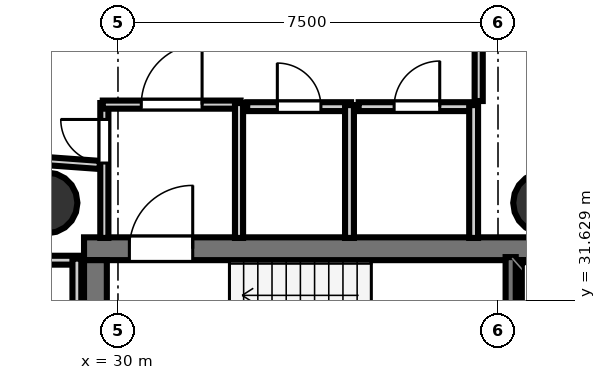
"""IFC4 building model, lengths in metres.
Left out: names, types, materials, properties, quantities, classifications, styles, units other than length and angle.
Written with IfcOpenShell. Run it as: python <this file> out.ifc"""

import sys

from ifc_helpers import new_model, si_unit, direction, frame, frame_2d, origin, origin_2d, place, context, subcontext, project, spatial, rectangle, hollow_circle, extrude, element, fill, save


model = new_model("IFC4")
c1 = context("Model", 3, precision=1e-05, world=origin(), true_north=direction((0.0, 1.0)))
c2 = subcontext(c1, "Body", "Model", "MODEL_VIEW")
j1 = project(units=[si_unit("LENGTHUNIT", "METRE"), si_unit("PLANEANGLEUNIT", "RADIAN")], contexts=[c1])
p1 = place(None, origin())
s1 = spatial("IfcSite", under=j1, at=p1, CompositionType="ELEMENT")
p2 = place(p1, origin())
s2 = spatial("IfcBuilding", under=s1, at=p2, CompositionType="ELEMENT")
p3 = place(p2, frame((0.0, 0.0, 189.2)))
s3 = spatial("IfcBuildingStorey", under=s2, at=p3, CompositionType="ELEMENT", Elevation=189.2)
p4 = place(p3, frame((29.33, 32.645, 0.0), z_axis=(0.0, 0.0, 1.0), x_axis=(1.0, 0.0, 0.0)))
e1 = element("IfcWall", 1, at=p4, inside=s3, PredefinedType="SHEAR", context=c2, shape_type="SweptSolid", body=[
    extrude(rectangle(XDim=10.52, YDim=0.45, at=frame_2d((5.26, 0.0))), origin(), (0.0, 0.0, 1.0), 3.52),
])
p5 = place(p4, frame((0.895, 0.0, 0.0)))
e2 = element("IfcOpeningElement", 2, at=p5, cuts=e1, PredefinedType="OPENING", context=c2, shape_type="SweptSolid", body=[
    extrude(rectangle(XDim=1.25, YDim=2.15, at=frame_2d((0.625, 1.075))), frame((0.0, 0.235, 0.0), z_axis=(0.0, -1.0, 0.0), x_axis=(1.0, 0.0, 0.0)), (0.0, 0.0, 1.0), 0.47),
])
for number, where, z_axis, x_axis in (
    (3, (29.555, 24.98, 0.0), (0.0, 0.0, 1.0), (0.0, 1.0, 0.0)),
    (4, (38.18, 24.98, 0.0), (0.0, 0.0, 1.0), (0.0, 1.0, 0.0)),
):
    element("IfcWall", number, at=place(p3, frame(where, z_axis=z_axis, x_axis=x_axis)), inside=s3, PredefinedType="SHEAR", context=c2, shape_type="SweptSolid", body=[
        extrude(rectangle(XDim=7.44, YDim=0.45, at=frame_2d((3.72, 0.0))), origin(), (0.0, 0.0, 1.0), 3.52),
    ])
for number, where, z_axis, x_axis in (
    (5, (28.6, 33.55, 0.0), (0.0, 0.0, 1.0), (1.0, 0.0, 0.0)),
    (6, (38.4, 33.55, 0.0), (0.0, 0.0, 1.0), (1.0, 0.0, 0.0)),
):
    element("IfcColumn", number, at=place(p3, frame(where, z_axis=z_axis, x_axis=x_axis)), inside=s3, PredefinedType="COLUMN", context=c2, shape_type="SweptSolid", body=[
        extrude(hollow_circle(Radius=0.6, WallThickness=0.03, at=origin_2d()), origin(), (0.0, 0.0, 1.0), 3.7),
    ])
p6 = place(p3, frame((37.75, 30.12, 0.0), z_axis=(0.0, 0.0, 1.0), x_axis=(0.0, 1.0, 0.0)))
e7 = element("IfcWall", 7, at=p6, inside=s3, PredefinedType="SOLIDWALL", context=c2, shape_type="SweptSolid", body=[
    extrude(rectangle(XDim=2.36, YDim=0.2, at=frame_2d((1.18, 0.0))), origin(), (0.0, 0.0, 1.0), 3.52),
])
p7 = place(p3, frame((29.731, 32.858, 0.0), z_axis=(0.0, 0.0, 1.0), x_axis=(0.0, 1.0, 0.0)))
e8 = element("IfcWall", 8, at=p7, inside=s3, PredefinedType="PARTITIONING", context=c2, shape_type="SweptSolid", body=[
    extrude(rectangle(XDim=2.662, YDim=0.16, at=frame_2d((1.331, 0.0))), origin(), (0.0, 0.0, 1.0), 2.84),
])
p8 = place(p7, frame((1.478, 0.0, 0.0)))
e9 = element("IfcOpeningElement", 9, at=p8, cuts=e8, PredefinedType="OPENING", context=c2, shape_type="SweptSolid", body=[
    extrude(rectangle(XDim=0.86, YDim=2.05, at=frame_2d((0.43, 1.025))), frame((0.0, 0.09, 0.0), z_axis=(0.0, -1.0, 0.0), x_axis=(1.0, 0.0, 0.0)), (0.0, 0.0, 1.0), 0.18),
])
p9 = place(p3, frame((29.7, 35.489, 0.0), z_axis=(0.0, 0.0, 1.0), x_axis=(1.0, 0.0, 0.0)))
e10 = element("IfcWall", 10, at=p9, inside=s3, PredefinedType="PARTITIONING", context=c2, shape_type="SweptSolid", body=[
    extrude(rectangle(XDim=2.72, YDim=0.16, at=frame_2d((1.36, 0.0))), origin(), (0.0, 0.0, 1.0), 2.84),
])
p10 = place(p9, frame((0.76, 0.0, 0.0)))
e11 = element("IfcOpeningElement", 11, at=p10, cuts=e10, PredefinedType="OPENING", context=c2, shape_type="SweptSolid", body=[
    extrude(rectangle(XDim=1.2, YDim=2.15, at=frame_2d((0.6, 1.075))), frame((0.0, 0.09, 0.0), z_axis=(0.0, -1.0, 0.0), x_axis=(1.0, 0.0, 0.0)), (0.0, 0.0, 1.0), 0.18),
])
p11 = place(p3, frame((32.389, 35.52, 0.0), z_axis=(0.0, 0.0, 1.0), x_axis=(0.0, -1.0, 0.0)))
e12 = element("IfcWall", 12, at=p11, inside=s3, PredefinedType="PARTITIONING", context=c2, shape_type="SweptSolid", body=[
    extrude(rectangle(XDim=2.662, YDim=0.16, at=frame_2d((1.331, 0.0))), origin(), (0.0, 0.0, 1.0), 2.84),
])
p12 = place(p3, frame((32.55, 35.449, 0.0), z_axis=(0.0, 0.0, 1.0), x_axis=(1.0, 0.0, 0.0)))
e13 = element("IfcWall", 13, at=p12, inside=s3, PredefinedType="PLUMBINGWALL", context=c2, shape_type="SweptSolid", body=[
    extrude(rectangle(XDim=2.05, YDim=0.175, at=frame_2d((1.025, 0.0))), origin(), (0.0, 0.0, 1.0), 2.84),
])
p13 = place(p12, frame((0.595, 0.0, 0.0)))
e14 = element("IfcOpeningElement", 14, at=p13, cuts=e13, PredefinedType="OPENING", context=c2, shape_type="SweptSolid", body=[
    extrude(rectangle(XDim=0.86, YDim=2.05, at=frame_2d((0.43, 1.025))), frame((0.0, 0.097, 0.0), z_axis=(0.0, -1.0, 0.0), x_axis=(1.0, 0.0, 0.0)), (0.0, 0.0, 1.0), 0.195),
])
p14 = place(p3, frame((34.569, 35.48, 0.0), z_axis=(0.0, 0.0, 1.0), x_axis=(0.0, -1.0, 0.0)))
e15 = element("IfcWall", 15, at=p14, inside=s3, PredefinedType="PLUMBINGWALL", context=c2, shape_type="SweptSolid", body=[
    extrude(rectangle(XDim=2.622, YDim=0.175, at=frame_2d((1.311, 0.0))), origin(), (0.0, 0.0, 1.0), 2.84),
])
p15 = place(p3, frame((34.75, 35.449, 0.0), z_axis=(0.0, 0.0, 1.0), x_axis=(1.0, 0.0, 0.0)))
e16 = element("IfcWall", 16, at=p15, inside=s3, PredefinedType="PLUMBINGWALL", context=c2, shape_type="SweptSolid", body=[
    extrude(rectangle(XDim=2.3, YDim=0.175, at=frame_2d((1.15, 0.0))), origin(), (0.0, 0.0, 1.0), 2.84),
])
p16 = place(p15, frame((0.7, 0.0, 0.0)))
e17 = element("IfcOpeningElement", 17, at=p16, cuts=e16, PredefinedType="OPENING", context=c2, shape_type="SweptSolid", body=[
    extrude(rectangle(XDim=0.9, YDim=2.1, at=frame_2d((0.45, 1.05))), frame((0.0, 0.097, 0.0), z_axis=(0.0, -1.0, 0.0), x_axis=(1.0, 0.0, 0.0)), (0.0, 0.0, 1.0), 0.195),
])
p17 = place(p3, frame((37.019, 35.48, 0.0), z_axis=(0.0, 0.0, 1.0), x_axis=(0.0, -1.0, 0.0)))
e18 = element("IfcWall", 18, at=p17, inside=s3, PredefinedType="PLUMBINGWALL", context=c2, shape_type="SweptSolid", body=[
    extrude(rectangle(XDim=2.622, YDim=0.175, at=frame_2d((1.311, 0.0))), origin(), (0.0, 0.0, 1.0), 2.84),
])
p18 = place(p3, frame((27.72, 32.419, 0.0), z_axis=(0.0, 0.0, 1.0), x_axis=(1.0, 0.0, 0.0)))
e19 = element("IfcWall", 19, at=p18, inside=s3, PredefinedType="PLUMBINGWALL", context=c2, shape_type="SweptSolid", body=[
    extrude(rectangle(XDim=1.5, YDim=0.175, at=frame_2d((0.75, 0.0))), origin(), (0.0, 0.0, 1.0), 2.84),
])
p19 = place(p3, frame((29.189, 32.45, 0.0), z_axis=(0.0, 0.0, 1.0), x_axis=(0.0, -1.0, 0.0)))
e20 = element("IfcWall", 20, at=p19, inside=s3, PredefinedType="PLUMBINGWALL", context=c2, shape_type="SweptSolid", body=[
    extrude(rectangle(XDim=3.97, YDim=0.175, at=frame_2d((1.985, 0.0))), origin(), (0.0, 0.0, 1.0), 2.84),
])
p20 = place(p3, frame((37.119, 38.46, 0.0), z_axis=(0.0, 0.0, 1.0), x_axis=(0.0, -1.0, 0.0)))
e21 = element("IfcWall", 21, at=p20, inside=s3, PredefinedType="PARTITIONING", context=c2, shape_type="SweptSolid", body=[
    extrude(rectangle(XDim=2.9, YDim=0.16, at=frame_2d((1.45, 0.0))), origin(), (0.0, 0.0, 1.0), 2.84),
])
p21 = place(p3, frame((29.64, 34.299, 0.0), z_axis=(0.0, 0.0, 1.0), x_axis=(-0.997392224386, 0.072171675429, 0.0)))
e22 = element("IfcWall", 22, at=p21, inside=s3, PredefinedType="PARTITIONING", context=c2, shape_type="SweptSolid", body=[
    extrude(rectangle(XDim=1.201, YDim=0.16, at=frame_2d((0.601, 0.0))), origin(), (0.0, 0.0, 1.0), 2.84),
])
p22 = place(p5, origin())
e23 = element("IfcDoor", 23, at=p22, inside=s3, OperationType="SINGLE_SWING_RIGHT", PredefinedType="DOOR", context=c2, shape_type="SweptSolid", body=[
    extrude(rectangle(XDim=1.25, YDim=2.15, at=frame_2d((0.625, 1.075))), frame((0.0, 0.025, 0.0), z_axis=(0.0, -1.0, 0.0), x_axis=(1.0, 0.0, 0.0)), (0.0, 0.0, 1.0), 0.05),
])
fill(e2, e23)
p23 = place(p10, origin())
e24 = element("IfcDoor", 24, at=p23, inside=s3, OperationType="SINGLE_SWING_RIGHT", PredefinedType="DOOR", context=c2, shape_type="SweptSolid", body=[
    extrude(rectangle(XDim=1.2, YDim=2.15, at=frame_2d((0.6, 1.075))), frame((0.0, 0.025, 0.0), z_axis=(0.0, -1.0, 0.0), x_axis=(1.0, 0.0, 0.0)), (0.0, 0.0, 1.0), 0.05),
])
fill(e11, e24)
p24 = place(p13, origin())
e25 = element("IfcDoor", 25, at=p24, inside=s3, OperationType="SINGLE_SWING_LEFT", PredefinedType="DOOR", context=c2, shape_type="SweptSolid", body=[
    extrude(rectangle(XDim=0.86, YDim=2.05, at=frame_2d((0.43, 1.025))), frame((0.0, 0.025, 0.0), z_axis=(0.0, -1.0, 0.0), x_axis=(1.0, 0.0, 0.0)), (0.0, 0.0, 1.0), 0.05),
])
fill(e14, e25)
p25 = place(p16, origin())
e26 = element("IfcDoor", 26, at=p25, inside=s3, OperationType="SINGLE_SWING_RIGHT", PredefinedType="DOOR", context=c2, shape_type="SweptSolid", body=[
    extrude(rectangle(XDim=0.9, YDim=2.1, at=frame_2d((0.45, 1.05))), frame((0.0, 0.025, 0.0), z_axis=(0.0, -1.0, 0.0), x_axis=(1.0, 0.0, 0.0)), (0.0, 0.0, 1.0), 0.05),
])
fill(e17, e26)
p26 = place(p8, origin())
e27 = element("IfcDoor", 27, at=p26, inside=s3, OperationType="SINGLE_SWING_RIGHT", PredefinedType="DOOR", context=c2, shape_type="SweptSolid", body=[
    extrude(rectangle(XDim=0.86, YDim=2.05, at=frame_2d((0.43, 1.025))), frame((0.0, 0.025, 0.0), z_axis=(0.0, -1.0, 0.0), x_axis=(1.0, 0.0, 0.0)), (0.0, 0.0, 1.0), 0.05),
])
fill(e9, e27)
save(model, sys.argv[1])
